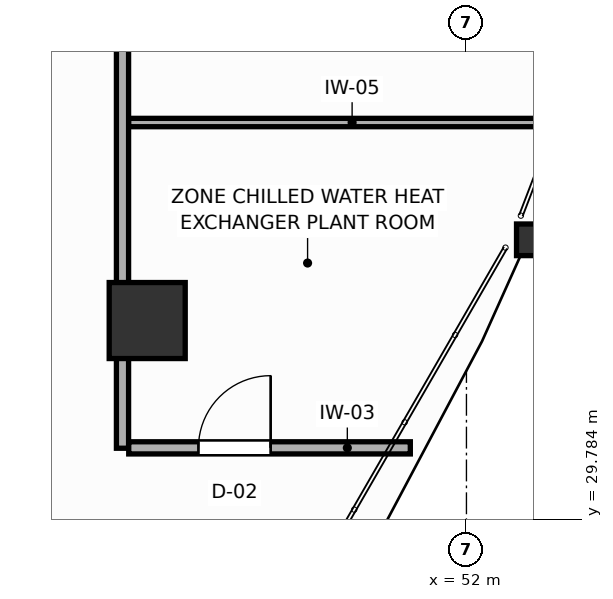
"""IFC4 building model, lengths in metres.
Left out: names, types, materials, properties, quantities, classifications, styles, units other than length and angle.
Written with IfcOpenShell. Run it as: python <this file> out.ifc"""

import sys

from ifc_helpers import new_model, si_unit, direction, frame, frame_2d, origin, origin_2d, place, context, subcontext, project, spatial, rectangle, i_section, extrude, source, transform, mapped, element, fill, save


model = new_model("IFC4")
c1 = context("Model", 3, precision=1e-05, world=origin(), true_north=direction((0.0, 1.0)))
c2 = subcontext(c1, "Body", "Model", "MODEL_VIEW")
j1 = project(units=[si_unit("LENGTHUNIT", "METRE"), si_unit("PLANEANGLEUNIT", "RADIAN")], contexts=[c1])
p1 = place(None, origin())
s1 = spatial("IfcSite", under=j1, at=p1, CompositionType="ELEMENT")
p2 = place(p1, origin())
s2 = spatial("IfcBuilding", under=s1, at=p2, CompositionType="ELEMENT")
p3 = place(p2, frame((0.0, 0.0, 201.0)))
s3 = spatial("IfcBuildingStorey", under=s2, at=p3, CompositionType="ELEMENT", Elevation=201.0)
m1 = source(origin(), c2, "Body", "SweptSolid", [
    extrude(rectangle(XDim=1.0, YDim=1.0, at=origin_2d()), origin(), (0.0, 0.0, 1.0), 4.8),
])
p4 = place(p3, frame((47.8, 32.4, 0.0), z_axis=(0.0, 0.0, 1.0), x_axis=(1.0, 0.0, 0.0)))
e1 = element("IfcColumn", 1, at=p4, inside=s3, PredefinedType="COLUMN", context=c2, shape_type="MappedRepresentation", body=[
    mapped(m1, transform((0.0, 0.0, 0.0), scale=1.0)),
])
m2 = source(origin(), c2, "Body", "SweptSolid", [
    extrude(i_section(OverallWidth=0.406, OverallDepth=0.416, WebThickness=0.027, FlangeThickness=0.044, FilletRadius=0.015, at=origin_2d()), origin(), (0.0, 0.0, 1.0), 4.8),
])
p5 = place(p3, frame((52.862, 33.462, 0.0), z_axis=(0.0, 0.0, 1.0), x_axis=(1.0, 0.0, 0.0)))
e2 = element("IfcColumn", 2, at=p5, inside=s3, PredefinedType="COLUMN", context=c2, shape_type="MappedRepresentation", body=[
    mapped(m2, transform((0.0, 0.0, 0.0), scale=1.0)),
])
p6 = place(p3, frame((47.475, 30.72, 0.0), z_axis=(0.0, 0.0, 1.0), x_axis=(0.0, 1.0, 0.0)))
e3 = element("IfcWall", 3, at=p6, inside=s3, PredefinedType="PARTITIONING", context=c2, shape_type="SweptSolid", body=[
    extrude(rectangle(XDim=18.373, YDim=0.16, at=frame_2d((9.187, 0.0))), origin(), (0.0, 0.0, 1.0), 4.61),
])
p7 = place(p3, frame((47.557, 30.725, 0.0), z_axis=(0.0, 0.0, 1.0), x_axis=(1.0, 0.0, 0.0)))
e4 = element("IfcWall", 4, at=p7, inside=s3, PredefinedType="PARTITIONING", context=c2, shape_type="SweptSolid", body=[
    extrude(rectangle(XDim=3.705, YDim=0.16, at=frame_2d((1.853, 0.0))), origin(), (0.0, 0.0, 1.0), 4.61),
])
p8 = place(p7, frame((0.917, 0.0, 0.0)))
e5 = element("IfcOpeningElement", 5, at=p8, cuts=e4, PredefinedType="OPENING", context=c2, shape_type="SweptSolid", body=[
    extrude(rectangle(XDim=0.95, YDim=2.05, at=frame_2d((0.475, 1.025))), frame((0.0, 0.09, 0.0), z_axis=(0.0, -1.0, 0.0), x_axis=(1.0, 0.0, 0.0)), (0.0, 0.0, 1.0), 0.18),
])
p9 = place(p3, frame((47.557, 35.005, 0.0), z_axis=(0.0, 0.0, 1.0), x_axis=(1.0, 0.0, 0.0)))
e6 = element("IfcWall", 6, at=p9, inside=s3, PredefinedType="MOVABLE", context=c2, shape_type="SweptSolid", body=[
    extrude(rectangle(XDim=5.878, YDim=0.11, at=frame_2d((2.939, 0.0))), origin(), (0.0, 0.0, 1.0), 4.61),
])
p10 = place(p8, origin())
e7 = element("IfcDoor", 7, at=p10, inside=s3, OperationType="SINGLE_SWING_RIGHT", PredefinedType="DOOR", context=c2, shape_type="SweptSolid", body=[
    extrude(rectangle(XDim=0.95, YDim=2.05, at=frame_2d((0.475, 1.025))), frame((0.0, 0.025, 0.0), z_axis=(0.0, -1.0, 0.0), x_axis=(1.0, 0.0, 0.0)), (0.0, 0.0, 1.0), 0.05),
])
fill(e5, e7)
save(model, sys.argv[1])
